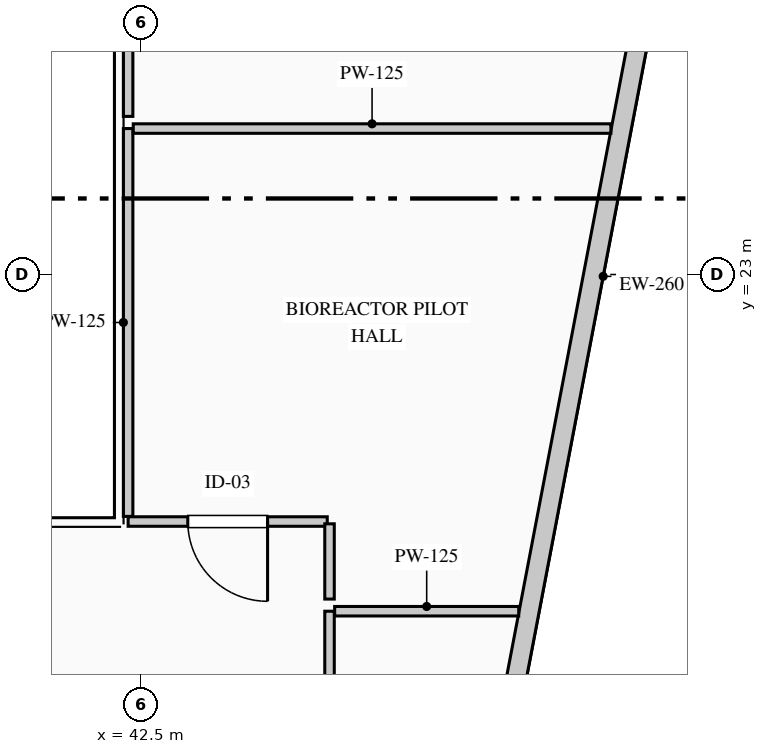
"""IFC4 building model, lengths in metres.
Left out: names, types, materials, properties, quantities, classifications, styles, units other than length and angle.
Written with IfcOpenShell. Run it as: python <this file> out.ifc"""

import sys

from ifc_helpers import new_model, si_unit, direction, frame, frame_2d, origin, place, context, subcontext, project, spatial, rectangle, extrude, element, fill, save


model = new_model("IFC4")
c1 = context("Model", 3, precision=1e-05, world=origin(), true_north=direction((0.0, 1.0)))
c2 = subcontext(c1, "Body", "Model", "MODEL_VIEW")
j1 = project(units=[si_unit("LENGTHUNIT", "METRE"), si_unit("PLANEANGLEUNIT", "RADIAN")], contexts=[c1])
p1 = place(None, origin())
s1 = spatial("IfcSite", under=j1, at=p1, CompositionType="ELEMENT")
p2 = place(p1, origin())
s2 = spatial("IfcBuilding", under=s1, at=p2, CompositionType="ELEMENT")
p3 = place(p2, frame((0.0, 0.0, 139.05)))
s3 = spatial("IfcBuildingStorey", under=s2, at=p3, CompositionType="ELEMENT", Elevation=139.05)
p4 = place(p3, frame((51.942, 41.27, 0.0), z_axis=(0.0, 0.0, 1.0), x_axis=(-0.187592192405, -0.982247000173, 0.0)))
e1 = element("IfcWall", 1, at=p4, inside=s3, PredefinedType="STANDARD", context=c2, shape_type="SweptSolid", body=[
    extrude(rectangle(XDim=37.2, YDim=0.26, at=frame_2d((18.6, 0.0))), origin(), (0.0, 0.0, 1.0), 3.69),
])
p5 = place(p4, frame((12.342, 0.0, 0.9)))
e2 = element("IfcOpeningElement", 2, at=p5, cuts=e1, PredefinedType="OPENING", context=c2, shape_type="SweptSolid", body=[
    extrude(rectangle(XDim=2.1, YDim=2.0, at=frame_2d((1.05, 1.0))), frame((0.0, 0.14, 0.0), z_axis=(0.0, -1.0, 0.0), x_axis=(1.0, 0.0, 0.0)), (0.0, 0.0, 1.0), 0.28),
])
p6 = place(p3, frame((44.98, 17.55, 0.0), z_axis=(0.0, 0.0, 1.0), x_axis=(0.0, 1.0, 0.0)))
e3 = element("IfcWall", 3, at=p6, inside=s3, PredefinedType="PARTITIONING", context=c2, shape_type="SweptSolid", body=[
    extrude(rectangle(XDim=1.02, YDim=0.125, at=frame_2d((0.51, 0.0))), origin(), (0.0, 0.0, 1.0), 3.69),
])
p7 = place(p3, frame((45.048, 18.57, 0.0), z_axis=(0.0, 0.0, 1.0), x_axis=(1.0, 0.0, 0.0)))
e4 = element("IfcWall", 4, at=p7, inside=s3, PredefinedType="PARTITIONING", context=c2, shape_type="SweptSolid", body=[
    extrude(rectangle(XDim=2.422, YDim=0.125, at=frame_2d((1.211, 0.0))), origin(), (0.0, 0.0, 1.0), 3.69),
])
p8 = place(p3, frame((44.95, 19.75, 0.0), z_axis=(0.0, 0.0, 1.0), x_axis=(-1.0, 0.0, 0.0)))
e5 = element("IfcWall", 5, at=p8, inside=s3, PredefinedType="PARTITIONING", context=c2, shape_type="SweptSolid", body=[
    extrude(rectangle(XDim=2.62, YDim=0.125, at=frame_2d((1.31, 0.0))), origin(), (0.0, 0.0, 1.0), 3.69),
])
p9 = place(p8, frame((0.785, 0.0, 0.0)))
e6 = element("IfcOpeningElement", 6, at=p9, cuts=e5, PredefinedType="OPENING", context=c2, shape_type="SweptSolid", body=[
    extrude(rectangle(XDim=1.05, YDim=2.15, at=frame_2d((0.525, 1.075))), frame((0.0, 0.073, 0.0), z_axis=(0.0, -1.0, 0.0), x_axis=(1.0, 0.0, 0.0)), (0.0, 0.0, 1.0), 0.145),
])
p10 = place(p3, frame((42.33, 19.817, 0.0), z_axis=(0.0, 0.0, 1.0), x_axis=(0.0, 1.0, 0.0)))
e7 = element("IfcWall", 7, at=p10, inside=s3, PredefinedType="PARTITIONING", context=c2, shape_type="SweptSolid", body=[
    extrude(rectangle(XDim=5.103, YDim=0.125, at=frame_2d((2.551, 0.0))), origin(), (0.0, 0.0, 1.0), 3.69),
])
p11 = place(p3, frame((42.397, 24.92, 0.0), z_axis=(0.0, 0.0, 1.0), x_axis=(1.0, 0.0, 0.0)))
e8 = element("IfcWall", 8, at=p11, inside=s3, PredefinedType="PARTITIONING", context=c2, shape_type="SweptSolid", body=[
    extrude(rectangle(XDim=6.284, YDim=0.125, at=frame_2d((3.142, 0.0))), origin(), (0.0, 0.0, 1.0), 3.69),
])
p12 = place(p3, frame((44.98, 18.73, 0.0), z_axis=(0.0, 0.0, 1.0), x_axis=(0.0, 1.0, 0.0)))
e9 = element("IfcWall", 9, at=p12, inside=s3, PredefinedType="PARTITIONING", context=c2, shape_type="SweptSolid", body=[
    extrude(rectangle(XDim=0.99, YDim=0.125, at=frame_2d((0.495, 0.0))), origin(), (0.0, 0.0, 1.0), 3.69),
])
p13 = place(p3, frame((42.33, 25.08, 0.0), z_axis=(0.0, 0.0, 1.0), x_axis=(0.0, 1.0, 0.0)))
e10 = element("IfcWall", 10, at=p13, inside=s3, PredefinedType="PARTITIONING", context=c2, shape_type="SweptSolid", body=[
    extrude(rectangle(XDim=3.55, YDim=0.125, at=frame_2d((1.775, 0.0))), origin(), (0.0, 0.0, 1.0), 3.69),
])
p14 = place(p9, origin())
e11 = element("IfcDoor", 11, at=p14, inside=s3, OperationType="SINGLE_SWING_LEFT", PredefinedType="DOOR", context=c2, shape_type="SweptSolid", body=[
    extrude(rectangle(XDim=1.05, YDim=2.15, at=frame_2d((0.525, 1.075))), frame((0.0, 0.025, 0.0), z_axis=(0.0, -1.0, 0.0), x_axis=(1.0, 0.0, 0.0)), (0.0, 0.0, 1.0), 0.05),
])
fill(e6, e11)
save(model, sys.argv[1])
